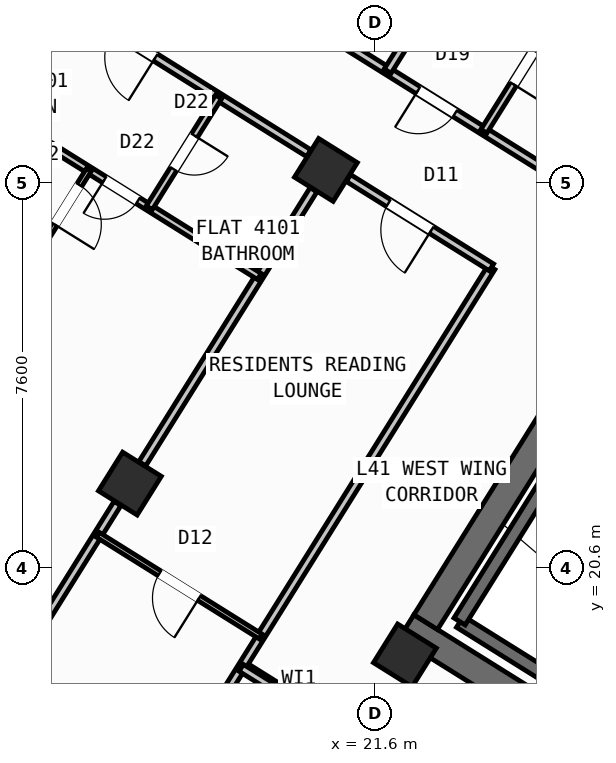
"""IFC4 building model, lengths in metres.
Left out: names, types, materials, properties, quantities, classifications, styles, units other than length and angle.
Written with IfcOpenShell. Run it as: python <this file> out.ifc"""

import sys

from ifc_helpers import new_model, si_unit, direction, frame, frame_2d, origin, origin_2d, place, context, subcontext, project, spatial, rectangle, hollow_rectangle, extrude, source, transform, mapped, element, fill, save


model = new_model("IFC4")
c1 = context("Model", 3, precision=1e-05, world=origin(), true_north=direction((0.0, 1.0)))
c2 = subcontext(c1, "Body", "Model", "MODEL_VIEW")
j1 = project(units=[si_unit("LENGTHUNIT", "METRE"), si_unit("PLANEANGLEUNIT", "RADIAN")], contexts=[c1])
p1 = place(None, origin())
s1 = spatial("IfcSite", under=j1, at=p1, CompositionType="ELEMENT")
p2 = place(p1, origin())
s2 = spatial("IfcBuilding", under=s1, at=p2, CompositionType="ELEMENT")
p3 = place(p2, frame((0.0, 0.0, 162.3)))
s3 = spatial("IfcBuildingStorey", under=s2, at=p3, CompositionType="ELEMENT", Elevation=162.3)
p4 = place(p3, frame((33.366, 12.477, 0.0), z_axis=(0.0, 0.0, 1.0), x_axis=(-0.848047359947, 0.529920442413, 0.0)))
e1 = element("IfcWall", 1, at=p4, inside=s3, PredefinedType="SHEAR", context=c2, shape_type="SweptSolid", body=[
    extrude(rectangle(XDim=13.14, YDim=0.55, at=frame_2d((6.57, 0.0))), origin(), (0.0, 0.0, 1.0), 3.35),
])
p5 = place(p3, frame((26.007, 24.976, 0.0), z_axis=(0.0, 0.0, 1.0), x_axis=(-0.529923795287, -0.848045264823, 0.0)))
e2 = element("IfcWall", 2, at=p5, inside=s3, PredefinedType="SHEAR", context=c2, shape_type="SweptSolid", body=[
    extrude(rectangle(XDim=6.425, YDim=0.55, at=frame_2d((3.212, 0.0))), origin(), (0.0, 0.0, 1.0), 3.35),
])
m1 = source(origin(), c2, "Body", "SweptSolid", [
    extrude(hollow_rectangle(XDim=0.9, YDim=0.9, WallThickness=0.036, at=origin_2d()), origin(), (0.0, 0.0, 1.0), 3.6),
])
for number, where, z_axis, x_axis in (
    (3, (22.191, 18.87, 0.0), (0.0, 0.0, 1.0), (-0.848, 0.53, 0.0)),
    (4, (20.632, 28.452, 0.0), (0.0, 0.0, 1.0), (-0.848, 0.53, 0.0)),
    (5, (16.764, 22.261, 0.0), (0.0, 0.0, 1.0), (-0.848, 0.53, 0.0)),
):
    element("IfcColumn", number, at=place(p3, frame(where, z_axis=z_axis, x_axis=x_axis)), inside=s3, PredefinedType="COLUMN", context=c2, shape_type="MappedRepresentation", body=[
        mapped(m1, transform((0.0, 0.0, 0.0), scale=1.0)),
    ])
p6 = place(p3, frame((29.268, 6.429, 0.0), z_axis=(0.0, 0.0, 1.0), x_axis=(-0.848049971435, 0.529916263149, 0.0)))
e6 = element("IfcWall", 6, at=p6, inside=s3, PredefinedType="STANDARD", context=c2, shape_type="SweptSolid", body=[
    extrude(rectangle(XDim=31.588, YDim=0.32, at=frame_2d((15.794, 0.0))), origin(), (0.0, 0.0, 1.0), 3.35),
])
p7 = place(p6, frame((16.362, 0.0, 0.0)))
e7 = element("IfcOpeningElement", 7, at=p7, cuts=e6, PredefinedType="OPENING", context=c2, shape_type="SweptSolid", body=[
    extrude(rectangle(XDim=1.2, YDim=2.15, at=frame_2d((0.6, 1.075))), frame((0.0, 0.17, 0.0), z_axis=(0.0, -1.0, 0.0), x_axis=(1.0, 0.0, 0.0)), (0.0, 0.0, 1.0), 0.34),
])
p8 = place(p6, frame((2.989, 0.0, 0.8)))
e8 = element("IfcOpeningElement", 8, at=p8, cuts=e6, PredefinedType="OPENING", context=c2, shape_type="SweptSolid", body=[
    extrude(rectangle(XDim=2.1, YDim=1.55, at=frame_2d((1.05, 0.775))), frame((0.0, 0.17, 0.0), z_axis=(0.0, -1.0, 0.0), x_axis=(1.0, 0.0, 0.0)), (0.0, 0.0, 1.0), 0.34),
])
p9 = place(p6, frame((8.359, 0.0, 0.8)))
e9 = element("IfcOpeningElement", 9, at=p9, cuts=e6, PredefinedType="OPENING", context=c2, shape_type="SweptSolid", body=[
    extrude(rectangle(XDim=2.1, YDim=1.55, at=frame_2d((1.05, 0.775))), frame((0.0, 0.17, 0.0), z_axis=(0.0, -1.0, 0.0), x_axis=(1.0, 0.0, 0.0)), (0.0, 0.0, 1.0), 0.34),
])
p10 = place(p6, frame((13.284, 0.0, 0.95)))
e10 = element("IfcOpeningElement", 10, at=p10, cuts=e6, PredefinedType="OPENING", context=c2, shape_type="SweptSolid", body=[
    extrude(rectangle(XDim=1.2, YDim=1.4, at=frame_2d((0.6, 0.7))), frame((0.0, 0.17, 0.0), z_axis=(0.0, -1.0, 0.0), x_axis=(1.0, 0.0, 0.0)), (0.0, 0.0, 1.0), 0.34),
])
p11 = place(p6, frame((20.39, 0.0, 0.95)))
e11 = element("IfcOpeningElement", 11, at=p11, cuts=e6, PredefinedType="OPENING", context=c2, shape_type="SweptSolid", body=[
    extrude(rectangle(XDim=1.2, YDim=1.4, at=frame_2d((0.6, 0.7))), frame((0.0, 0.17, 0.0), z_axis=(0.0, -1.0, 0.0), x_axis=(1.0, 0.0, 0.0)), (0.0, 0.0, 1.0), 0.34),
])
p12 = place(p6, frame((23.715, 0.0, 1.0)))
e12 = element("IfcOpeningElement", 12, at=p12, cuts=e6, PredefinedType="OPENING", context=c2, shape_type="SweptSolid", body=[
    extrude(rectangle(XDim=0.9, YDim=1.25, at=frame_2d((0.45, 0.625))), frame((0.0, 0.17, 0.0), z_axis=(0.0, -1.0, 0.0), x_axis=(1.0, 0.0, 0.0)), (0.0, 0.0, 1.0), 0.34),
])
p13 = place(p6, frame((26.106, 0.0, 0.85)))
e13 = element("IfcOpeningElement", 13, at=p13, cuts=e6, PredefinedType="OPENING", context=c2, shape_type="SweptSolid", body=[
    extrude(rectangle(XDim=1.5, YDim=1.5, at=frame_2d((0.75, 0.75))), frame((0.0, 0.17, 0.0), z_axis=(0.0, -1.0, 0.0), x_axis=(1.0, 0.0, 0.0)), (0.0, 0.0, 1.0), 0.34),
])
p14 = place(p6, frame((29.068, 0.0, 0.85)))
e14 = element("IfcOpeningElement", 14, at=p14, cuts=e6, PredefinedType="OPENING", context=c2, shape_type="SweptSolid", body=[
    extrude(rectangle(XDim=1.8, YDim=1.5, at=frame_2d((0.9, 0.75))), frame((0.0, 0.17, 0.0), z_axis=(0.0, -1.0, 0.0), x_axis=(1.0, 0.0, 0.0)), (0.0, 0.0, 1.0), 0.34),
])
p15 = place(p3, frame((14.138, 41.825, 0.0), z_axis=(0.0, 0.0, 1.0), x_axis=(0.848046498049, -0.529921821731, 0.0)))
e15 = element("IfcWall", 15, at=p15, inside=s3, PredefinedType="STANDARD", context=c2, shape_type="SweptSolid", body=[
    extrude(rectangle(XDim=31.588, YDim=0.32, at=frame_2d((15.794, 0.0))), origin(), (0.0, 0.0, 1.0), 3.35),
])
p16 = place(p15, frame((3.253, 0.0, 0.0)))
e16 = element("IfcOpeningElement", 16, at=p16, cuts=e15, PredefinedType="OPENING", context=c2, shape_type="SweptSolid", body=[
    extrude(rectangle(XDim=1.05, YDim=2.15, at=frame_2d((0.525, 1.075))), frame((0.0, 0.17, 0.0), z_axis=(0.0, -1.0, 0.0), x_axis=(1.0, 0.0, 0.0)), (0.0, 0.0, 1.0), 0.34),
])
p17 = place(p15, frame((0.863, 0.0, 0.85)))
e17 = element("IfcOpeningElement", 17, at=p17, cuts=e15, PredefinedType="OPENING", context=c2, shape_type="SweptSolid", body=[
    extrude(rectangle(XDim=1.8, YDim=1.5, at=frame_2d((0.9, 0.75))), frame((0.0, 0.17, 0.0), z_axis=(0.0, -1.0, 0.0), x_axis=(1.0, 0.0, 0.0)), (0.0, 0.0, 1.0), 0.34),
])
p18 = place(p15, frame((8.494, 0.0, 0.85)))
e18 = element("IfcOpeningElement", 18, at=p18, cuts=e15, PredefinedType="OPENING", context=c2, shape_type="SweptSolid", body=[
    extrude(rectangle(XDim=1.8, YDim=1.5, at=frame_2d((0.9, 0.75))), frame((0.0, 0.17, 0.0), z_axis=(0.0, -1.0, 0.0), x_axis=(1.0, 0.0, 0.0)), (0.0, 0.0, 1.0), 0.34),
])
p19 = place(p15, frame((13.874, 0.0, 0.85)))
e19 = element("IfcOpeningElement", 19, at=p19, cuts=e15, PredefinedType="OPENING", context=c2, shape_type="SweptSolid", body=[
    extrude(rectangle(XDim=1.5, YDim=1.5, at=frame_2d((0.75, 0.75))), frame((0.0, 0.17, 0.0), z_axis=(0.0, -1.0, 0.0), x_axis=(1.0, 0.0, 0.0)), (0.0, 0.0, 1.0), 0.34),
])
p20 = place(p15, frame((17.104, 0.0, 1.0)))
e20 = element("IfcOpeningElement", 20, at=p20, cuts=e15, PredefinedType="OPENING", context=c2, shape_type="SweptSolid", body=[
    extrude(rectangle(XDim=0.9, YDim=1.25, at=frame_2d((0.45, 0.625))), frame((0.0, 0.17, 0.0), z_axis=(0.0, -1.0, 0.0), x_axis=(1.0, 0.0, 0.0)), (0.0, 0.0, 1.0), 0.34),
])
p21 = place(p15, frame((22.144, 0.0, 1.0)))
e21 = element("IfcOpeningElement", 21, at=p21, cuts=e15, PredefinedType="OPENING", context=c2, shape_type="SweptSolid", body=[
    extrude(rectangle(XDim=0.9, YDim=1.25, at=frame_2d((0.45, 0.625))), frame((0.0, 0.17, 0.0), z_axis=(0.0, -1.0, 0.0), x_axis=(1.0, 0.0, 0.0)), (0.0, 0.0, 1.0), 0.34),
])
p22 = place(p15, frame((27.744, 0.0, 1.0)))
e22 = element("IfcOpeningElement", 22, at=p22, cuts=e15, PredefinedType="OPENING", context=c2, shape_type="SweptSolid", body=[
    extrude(rectangle(XDim=0.9, YDim=1.25, at=frame_2d((0.45, 0.625))), frame((0.0, 0.17, 0.0), z_axis=(0.0, -1.0, 0.0), x_axis=(1.0, 0.0, 0.0)), (0.0, 0.0, 1.0), 0.34),
])
p23 = place(p3, frame((29.605, 15.581, 0.0), z_axis=(0.0, 0.0, 1.0), x_axis=(-0.848036911448, 0.529937163087, 0.0)))
e23 = element("IfcWall", 23, at=p23, inside=s3, PredefinedType="SHEAR", context=c2, shape_type="SweptSolid", body=[
    extrude(rectangle(XDim=7.46, YDim=0.26, at=frame_2d((3.73, 0.0))), origin(), (0.0, 0.0, 1.0), 3.35),
])
p24 = place(p3, frame((24.945, 22.22, 0.0), z_axis=(0.0, 0.0, 1.0), x_axis=(-0.529908658664, -0.84805472316, 0.0)))
e24 = element("IfcWall", 24, at=p24, inside=s3, PredefinedType="SHEAR", context=c2, shape_type="SweptSolid", body=[
    extrude(rectangle(XDim=3.16, YDim=0.26, at=frame_2d((1.58, 0.0))), origin(), (0.0, 0.0, 1.0), 3.35),
])
p25 = place(p3, frame((21.206, 17.292, 0.0), z_axis=(0.0, 0.0, 1.0), x_axis=(-0.848050851465, 0.529914854792, 0.0)))
e25 = element("IfcWall", 25, at=p25, inside=s3, PredefinedType="PARTITIONING", context=c2, shape_type="SweptSolid", body=[
    extrude(rectangle(XDim=2.61, YDim=0.16, at=frame_2d((1.305, 0.0))), origin(), (0.0, 0.0, 1.0), 3.34),
])
p26 = place(p3, frame((23.899, 26.529, 0.0), z_axis=(0.0, 0.0, 1.0), x_axis=(-0.529917716469, -0.848049063305, 0.0)))
e26 = element("IfcWall", 26, at=p26, inside=s3, PredefinedType="PARTITIONING", context=c2, shape_type="SweptSolid", body=[
    extrude(rectangle(XDim=14.05, YDim=0.16, at=frame_2d((7.025, 0.0))), origin(), (0.0, 0.0, 1.0), 3.34),
])
p27 = place(p3, frame((25.065, 28.394, 0.0), z_axis=(0.0, 0.0, 1.0), x_axis=(-0.848048310262, 0.529918921593, 0.0)))
e27 = element("IfcWall", 27, at=p27, inside=s3, PredefinedType="PARTITIONING", context=c2, shape_type="SweptSolid", body=[
    extrude(rectangle(XDim=16.73, YDim=0.16, at=frame_2d((8.365, 0.0))), origin(), (0.0, 0.0, 1.0), 3.34),
])
p28 = place(p27, frame((2.22, 0.0, 0.0)))
e28 = element("IfcOpeningElement", 28, at=p28, cuts=e27, PredefinedType="OPENING", context=c2, shape_type="SweptSolid", body=[
    extrude(rectangle(XDim=0.86, YDim=2.05, at=frame_2d((0.43, 1.025))), frame((0.0, 0.09, 0.0), z_axis=(0.0, -1.0, 0.0), x_axis=(1.0, 0.0, 0.0)), (0.0, 0.0, 1.0), 0.18),
])
p29 = place(p27, frame((7.82, 0.0, 0.0)))
e29 = element("IfcOpeningElement", 29, at=p29, cuts=e27, PredefinedType="OPENING", context=c2, shape_type="SweptSolid", body=[
    extrude(rectangle(XDim=1.0, YDim=2.1, at=frame_2d((0.5, 1.05))), frame((0.0, 0.09, 0.0), z_axis=(0.0, -1.0, 0.0), x_axis=(1.0, 0.0, 0.0)), (0.0, 0.0, 1.0), 0.18),
])
p30 = place(p27, frame((12.95, 0.0, 0.0)))
e30 = element("IfcOpeningElement", 30, at=p30, cuts=e27, PredefinedType="OPENING", context=c2, shape_type="SweptSolid", body=[
    extrude(rectangle(XDim=1.0, YDim=2.1, at=frame_2d((0.5, 1.05))), frame((0.0, 0.09, 0.0), z_axis=(0.0, -1.0, 0.0), x_axis=(1.0, 0.0, 0.0)), (0.0, 0.0, 1.0), 0.18),
])
p31 = place(p3, frame((23.899, 26.529, 0.0), z_axis=(0.0, 0.0, 1.0), x_axis=(-0.848064240775, 0.529893426567, 0.0)))
e31 = element("IfcWall", 31, at=p31, inside=s3, PredefinedType="PARTITIONING", context=c2, shape_type="SweptSolid", body=[
    extrude(rectangle(XDim=3.328, YDim=0.16, at=frame_2d((1.664, 0.0))), origin(), (0.0, 0.0, 1.0), 2.775),
])
p32 = place(p31, frame((1.395, 0.0, 0.0)))
e32 = element("IfcOpeningElement", 32, at=p32, cuts=e31, PredefinedType="OPENING", context=c2, shape_type="SweptSolid", body=[
    extrude(rectangle(XDim=1.0, YDim=2.1, at=frame_2d((0.5, 1.05))), frame((0.0, 0.09, 0.0), z_axis=(0.0, -1.0, 0.0), x_axis=(1.0, 0.0, 0.0)), (0.0, 0.0, 1.0), 0.18),
])
p33 = place(p3, frame((20.293, 28.782, 0.0), z_axis=(0.0, 0.0, 1.0), x_axis=(-0.848040881926, 0.529930809241, 0.0)))
e33 = element("IfcWall", 33, at=p33, inside=s3, PredefinedType="PARTITIONING", context=c2, shape_type="SweptSolid", body=[
    extrude(rectangle(XDim=5.476, YDim=0.16, at=frame_2d((2.738, 0.0))), origin(), (0.0, 0.0, 1.0), 2.775),
])
p34 = place(p33, frame((3.568, 0.0, 0.0)))
e34 = element("IfcOpeningElement", 34, at=p34, cuts=e33, PredefinedType="OPENING", context=c2, shape_type="SweptSolid", body=[
    extrude(rectangle(XDim=1.0, YDim=2.1, at=frame_2d((0.5, 1.05))), frame((0.0, 0.09, 0.0), z_axis=(0.0, -1.0, 0.0), x_axis=(1.0, 0.0, 0.0)), (0.0, 0.0, 1.0), 0.18),
])
p35 = place(p3, frame((20.387, 28.06, 0.0), z_axis=(0.0, 0.0, 1.0), x_axis=(-0.529902564924, -0.848058530814, 0.0)))
e35 = element("IfcWall", 35, at=p35, inside=s3, PredefinedType="PARTITIONING", context=c2, shape_type="SweptSolid", body=[
    extrude(rectangle(XDim=6.376, YDim=0.16, at=frame_2d((3.188, 0.0))), origin(), (0.0, 0.0, 1.0), 2.775),
])
p36 = place(p3, frame((16.519, 21.87, 0.0), z_axis=(0.0, 0.0, 1.0), x_axis=(-0.529922447305, -0.848046107144, 0.0)))
e36 = element("IfcWall", 36, at=p36, inside=s3, PredefinedType="PARTITIONING", context=c2, shape_type="SweptSolid", body=[
    extrude(rectangle(XDim=5.451, YDim=0.16, at=frame_2d((2.726, 0.0))), origin(), (0.0, 0.0, 1.0), 2.775),
])
p37 = place(p3, frame((19.346, 19.242, 0.0), z_axis=(0.0, 0.0, 1.0), x_axis=(-0.848059820872, 0.529900500304, 0.0)))
e37 = element("IfcWall", 37, at=p37, inside=s3, PredefinedType="PARTITIONING", context=c2, shape_type="SweptSolid", body=[
    extrude(rectangle(XDim=3.79, YDim=0.11, at=frame_2d((1.895, 0.0))), origin(), (0.0, 0.0, 1.0), 3.34),
])
p38 = place(p37, frame((1.435, 0.0, 0.0)))
e38 = element("IfcOpeningElement", 38, at=p38, cuts=e37, PredefinedType="OPENING", context=c2, shape_type="SweptSolid", body=[
    extrude(rectangle(XDim=0.92, YDim=2.08, at=frame_2d((0.46, 1.04))), frame((0.0, 0.065, 0.0), z_axis=(0.0, -1.0, 0.0), x_axis=(1.0, 0.0, 0.0)), (0.0, 0.0, 1.0), 0.13),
])
p39 = place(p3, frame((19.318, 26.349, 0.0), z_axis=(0.0, 0.0, 1.0), x_axis=(-0.848039019877, 0.529933789039, 0.0)))
e39 = element("IfcWall", 39, at=p39, inside=s3, PredefinedType="PLUMBINGWALL", context=c2, shape_type="SweptSolid", body=[
    extrude(rectangle(XDim=6.4, YDim=0.14, at=frame_2d((3.2, 0.0))), origin(), (0.0, 0.0, 1.0), 3.34),
])
p40 = place(p39, frame((2.824, 0.0, 0.0)))
e40 = element("IfcOpeningElement", 40, at=p40, cuts=e39, PredefinedType="OPENING", context=c2, shape_type="SweptSolid", body=[
    extrude(rectangle(XDim=0.78, YDim=2.05, at=frame_2d((0.39, 1.025))), frame((0.0, 0.08, 0.0), z_axis=(0.0, -1.0, 0.0), x_axis=(1.0, 0.0, 0.0)), (0.0, 0.0, 1.0), 0.16),
])
p41 = place(p3, frame((18.514, 29.894, 0.0), z_axis=(0.0, 0.0, 1.0), x_axis=(-0.529913878929, -0.848051461244, 0.0)))
e41 = element("IfcWall", 41, at=p41, inside=s3, PredefinedType="PLUMBINGWALL", context=c2, shape_type="SweptSolid", body=[
    extrude(rectangle(XDim=2.58, YDim=0.14, at=frame_2d((1.29, 0.0))), origin(), (0.0, 0.0, 1.0), 3.34),
])
p42 = place(p41, frame((0.9, 0.0, 0.0)))
e42 = element("IfcOpeningElement", 42, at=p42, cuts=e41, PredefinedType="OPENING", context=c2, shape_type="SweptSolid", body=[
    extrude(rectangle(XDim=0.78, YDim=2.05, at=frame_2d((0.39, 1.025))), frame((0.0, 0.08, 0.0), z_axis=(0.0, -1.0, 0.0), x_axis=(1.0, 0.0, 0.0)), (0.0, 0.0, 1.0), 0.16),
])
p43 = place(p3, frame((15.953, 28.452, 0.0), z_axis=(0.0, 0.0, 1.0), x_axis=(-0.529931645041, -0.848040359643, 0.0)))
e43 = element("IfcWall", 43, at=p43, inside=s3, PredefinedType="PARTITIONING", context=c2, shape_type="SweptSolid", body=[
    extrude(rectangle(XDim=11.74, YDim=0.11, at=frame_2d((5.87, 0.0))), origin(), (0.0, 0.0, 1.0), 3.34),
])
p44 = place(p43, frame((0.35, 0.0, 0.0)))
e44 = element("IfcOpeningElement", 44, at=p44, cuts=e43, PredefinedType="OPENING", context=c2, shape_type="SweptSolid", body=[
    extrude(rectangle(XDim=0.92, YDim=2.08, at=frame_2d((0.46, 1.04))), frame((0.0, 0.065, 0.0), z_axis=(0.0, -1.0, 0.0), x_axis=(1.0, 0.0, 0.0)), (0.0, 0.0, 1.0), 0.13),
])
p45 = place(p3, frame((24.256, 34.251, 0.0), z_axis=(0.0, 0.0, 1.0), x_axis=(-0.529926399231, -0.848043637673, 0.0)))
e45 = element("IfcWall", 45, at=p45, inside=s3, PredefinedType="PARTITIONING", context=c2, shape_type="SweptSolid", body=[
    extrude(rectangle(XDim=4.538, YDim=0.16, at=frame_2d((2.269, 0.0))), origin(), (0.0, 0.0, 1.0), 2.775),
])
p46 = place(p3, frame((25.324, 31.734, 0.0), z_axis=(0.0, 0.0, 1.0), x_axis=(-0.529873322326, -0.848076802116, 0.0)))
e46 = element("IfcWall", 46, at=p46, inside=s3, PredefinedType="PLUMBINGWALL", context=c2, shape_type="SweptSolid", body=[
    extrude(rectangle(XDim=2.97, YDim=0.14, at=frame_2d((1.485, 0.0))), origin(), (0.0, 0.0, 1.0), 2.995),
])
p47 = place(p46, frame((1.095, 0.0, 0.0)))
e47 = element("IfcOpeningElement", 47, at=p47, cuts=e46, PredefinedType="OPENING", context=c2, shape_type="SweptSolid", body=[
    extrude(rectangle(XDim=0.78, YDim=2.05, at=frame_2d((0.39, 1.025))), frame((0.0, 0.08, 0.0), z_axis=(0.0, -1.0, 0.0), x_axis=(1.0, 0.0, 0.0)), (0.0, 0.0, 1.0), 0.16),
])
p48 = place(p3, frame((32.164, 10.374, 0.0), z_axis=(0.0, 0.0, 1.0), x_axis=(-0.848044107957, 0.529925646633, 0.0)))
e48 = element("IfcWall", 48, at=p48, inside=s3, PredefinedType="PARTITIONING", context=c2, shape_type="SweptSolid", body=[
    extrude(rectangle(XDim=15.57, YDim=0.16, at=frame_2d((7.785, 0.0))), origin(), (0.0, 0.0, 1.0), 3.34),
])
p49 = place(p48, frame((10.83, 0.0, 0.0)))
e49 = element("IfcOpeningElement", 49, at=p49, cuts=e48, PredefinedType="OPENING", context=c2, shape_type="SweptSolid", body=[
    extrude(rectangle(XDim=1.0, YDim=2.1, at=frame_2d((0.5, 1.05))), frame((0.0, 0.09, 0.0), z_axis=(0.0, -1.0, 0.0), x_axis=(1.0, 0.0, 0.0)), (0.0, 0.0, 1.0), 0.18),
])
m2 = source(origin(), c2, "Body", "SweptSolid", [
    extrude(rectangle(XDim=1.0, YDim=2.1, at=frame_2d((0.5, 1.05))), frame((0.0, 0.025, 0.0), z_axis=(0.0, -1.0, 0.0), x_axis=(1.0, 0.0, 0.0)), (0.0, 0.0, 1.0), 0.05),
])
p50 = place(p32, origin())
e50 = element("IfcDoor", 50, at=p50, inside=s3, OperationType="SINGLE_SWING_LEFT", PredefinedType="DOOR", context=c2, shape_type="MappedRepresentation", body=[
    mapped(m2, transform((0.0, 0.0, 0.0), scale=1.0)),
])
fill(e32, e50)
m3 = source(origin(), c2, "Body", "SweptSolid", [
    extrude(rectangle(XDim=0.92, YDim=2.08, at=frame_2d((0.46, 1.04))), frame((0.0, 0.025, 0.0), z_axis=(0.0, -1.0, 0.0), x_axis=(1.0, 0.0, 0.0)), (0.0, 0.0, 1.0), 0.05),
])
p51 = place(p38, origin())
e51 = element("IfcDoor", 51, at=p51, inside=s3, OperationType="SINGLE_SWING_LEFT", PredefinedType="DOOR", context=c2, shape_type="MappedRepresentation", body=[
    mapped(m3, transform((0.0, 0.0, 0.0), scale=1.0)),
])
fill(e38, e51)
p52 = place(p44, origin())
e52 = element("IfcDoor", 52, at=p52, inside=s3, OperationType="SINGLE_SWING_RIGHT", PredefinedType="DOOR", context=c2, shape_type="MappedRepresentation", body=[
    mapped(m3, transform((0.0, 0.0, 0.0), scale=1.0)),
])
fill(e44, e52)
p53 = place(p34, origin())
e53 = element("IfcDoor", 53, at=p53, inside=s3, OperationType="SINGLE_SWING_LEFT", PredefinedType="DOOR", context=c2, shape_type="MappedRepresentation", body=[
    mapped(m2, transform((0.0, 0.0, 0.0), scale=1.0)),
])
fill(e34, e53)
m4 = source(origin(), c2, "Body", "SweptSolid", [
    extrude(rectangle(XDim=0.78, YDim=2.05, at=frame_2d((0.39, 1.025))), frame((0.0, 0.025, 0.0), z_axis=(0.0, -1.0, 0.0), x_axis=(1.0, 0.0, 0.0)), (0.0, 0.0, 1.0), 0.05),
])
p54 = place(p40, origin())
e54 = element("IfcDoor", 54, at=p54, inside=s3, OperationType="SINGLE_SWING_RIGHT", PredefinedType="DOOR", context=c2, shape_type="MappedRepresentation", body=[
    mapped(m4, transform((0.0, 0.0, 0.0), scale=1.0)),
])
fill(e40, e54)
p55 = place(p42, origin())
e55 = element("IfcDoor", 55, at=p55, inside=s3, OperationType="SINGLE_SWING_LEFT", PredefinedType="DOOR", context=c2, shape_type="MappedRepresentation", body=[
    mapped(m4, transform((0.0, 0.0, 0.0), scale=1.0)),
])
fill(e42, e55)
m5 = source(origin(), c2, "Body", "SweptSolid", [
    extrude(rectangle(XDim=0.86, YDim=2.05, at=frame_2d((0.43, 1.025))), frame((0.0, 0.025, 0.0), z_axis=(0.0, -1.0, 0.0), x_axis=(1.0, 0.0, 0.0)), (0.0, 0.0, 1.0), 0.05),
])
p56 = place(p28, origin())
e56 = element("IfcDoor", 56, at=p56, inside=s3, OperationType="SINGLE_SWING_RIGHT", PredefinedType="DOOR", context=c2, shape_type="MappedRepresentation", body=[
    mapped(m5, transform((0.0, 0.0, 0.0), scale=1.0)),
])
fill(e28, e56)
p57 = place(p47, origin())
e57 = element("IfcDoor", 57, at=p57, inside=s3, OperationType="SINGLE_SWING_RIGHT", PredefinedType="DOOR", context=c2, shape_type="MappedRepresentation", body=[
    mapped(m4, transform((0.0, 0.0, 0.0), scale=1.0)),
])
fill(e47, e57)
save(model, sys.argv[1])
